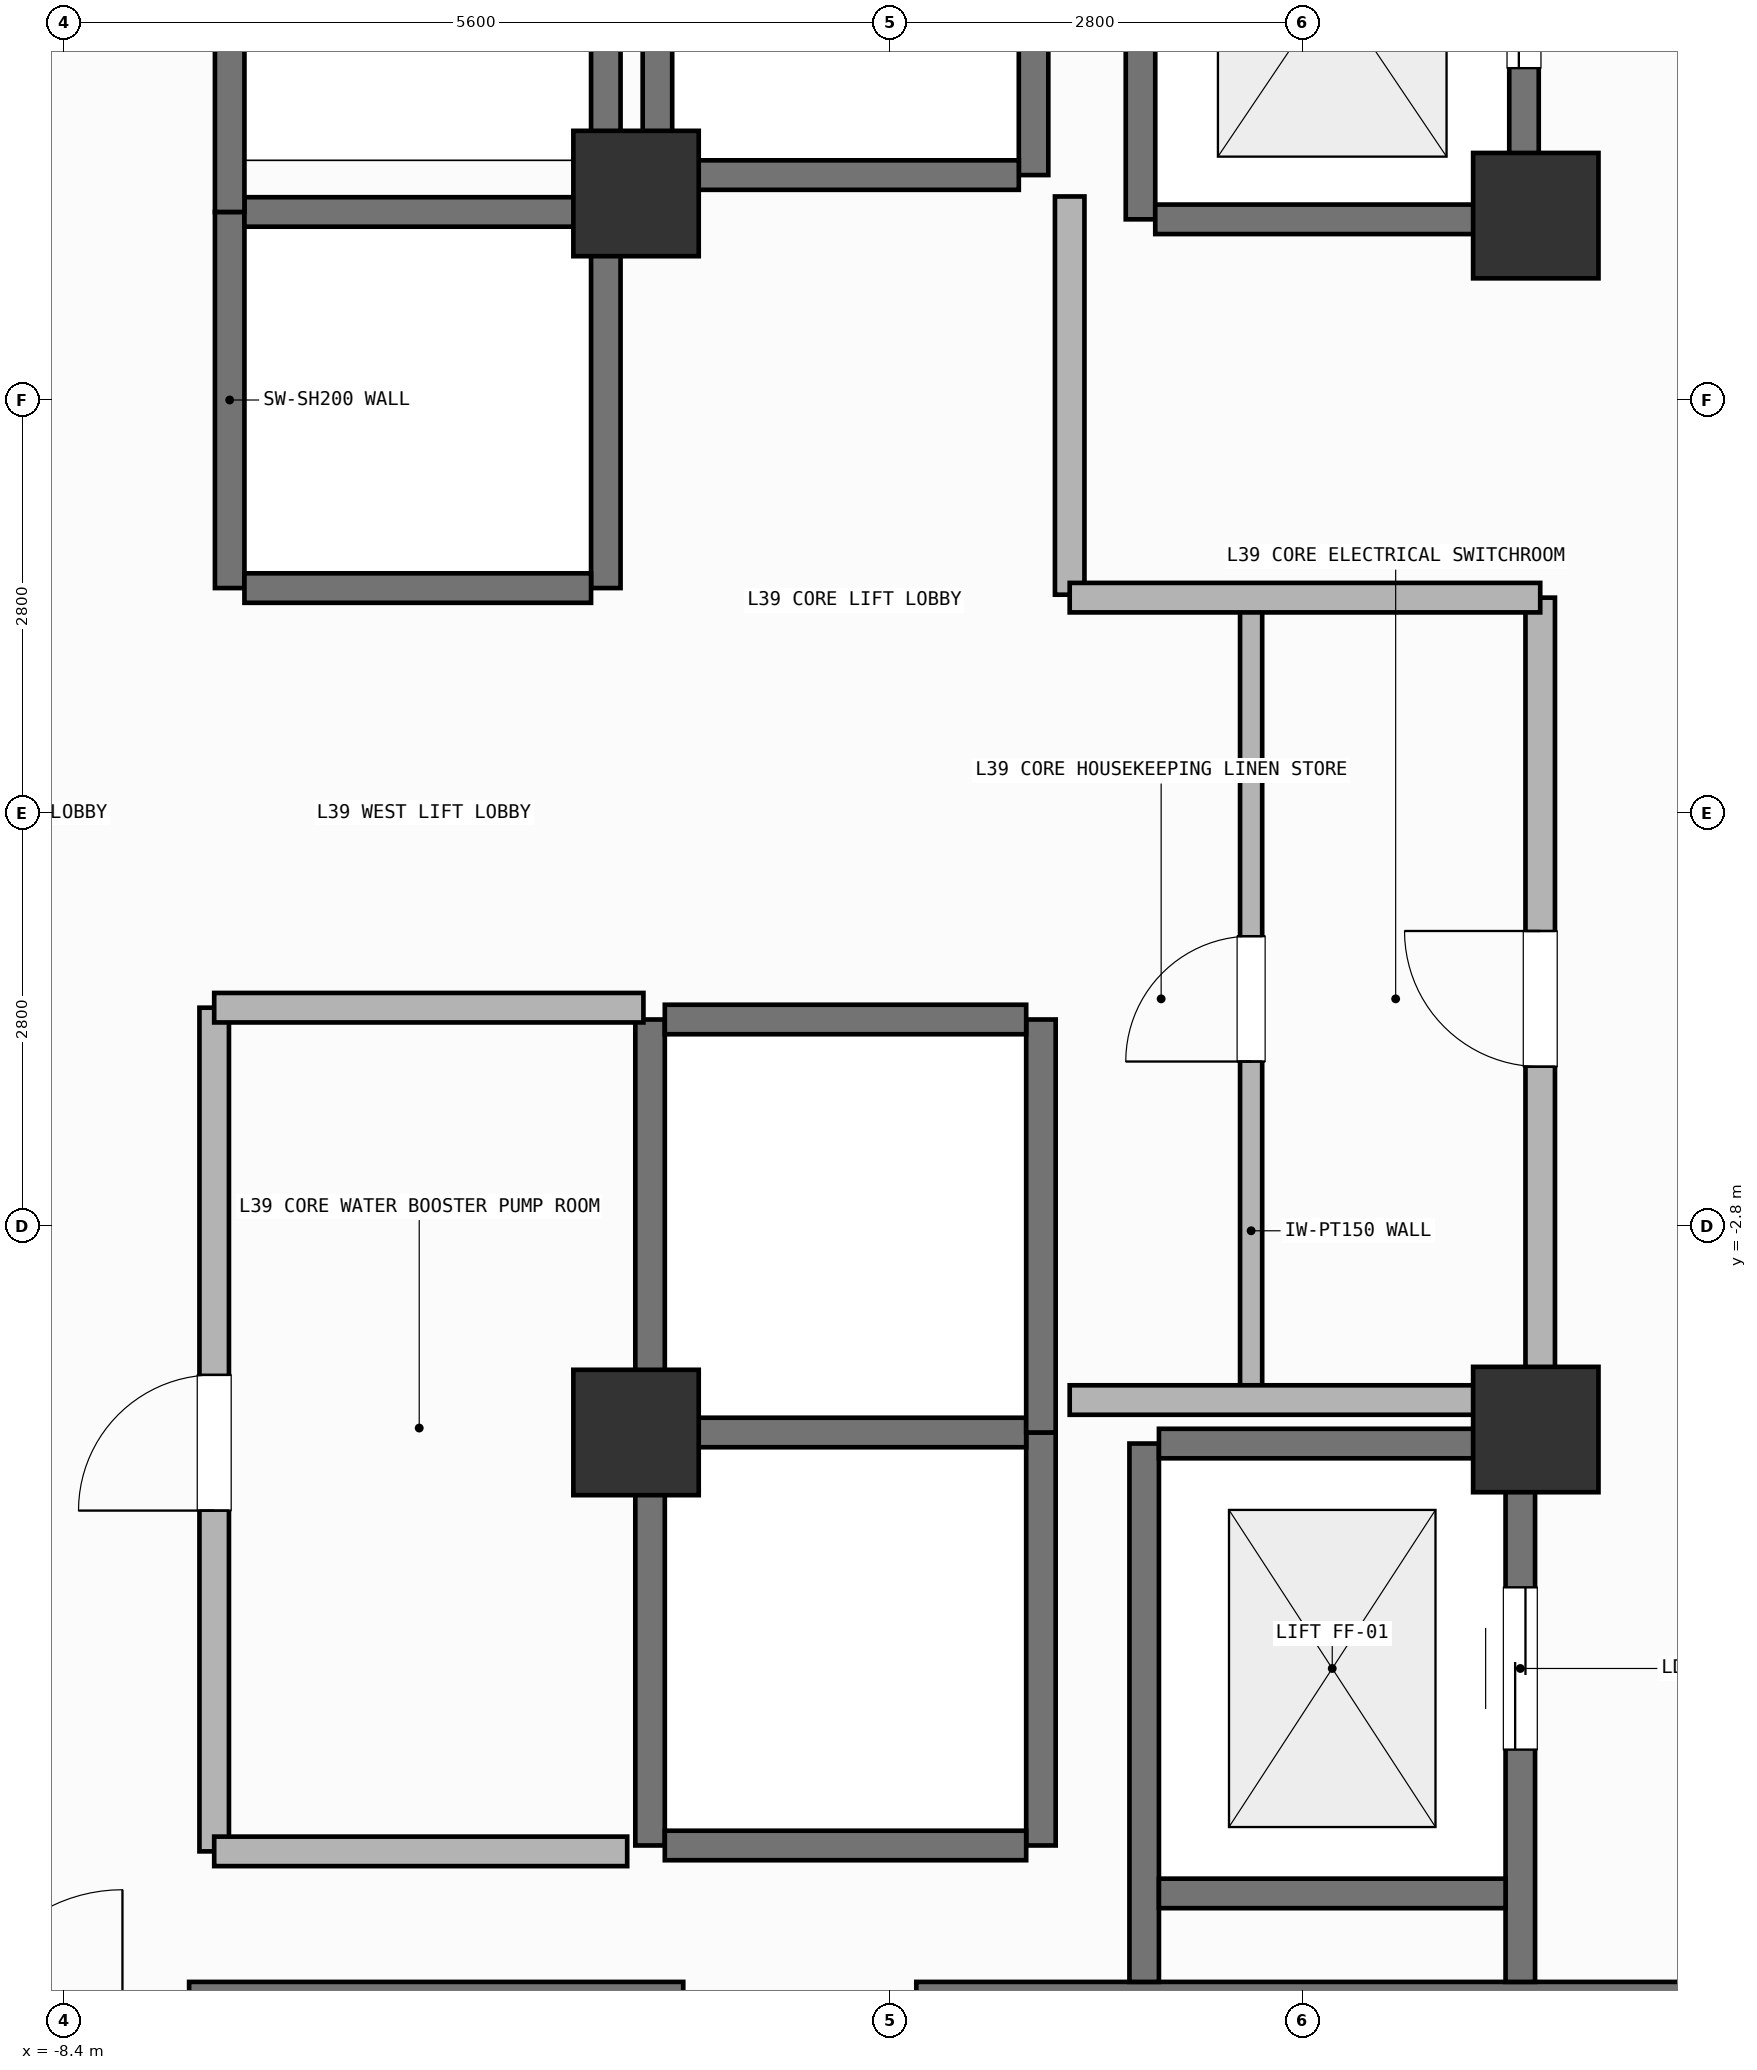
"""IFC4 building model, lengths in metres.
Left out: names, types, materials, properties, quantities, classifications, styles, units other than length and angle.
Written with IfcOpenShell. Run it as: python <this file> out.ifc"""

import sys

from ifc_helpers import new_model, si_unit, direction, frame, frame_2d, origin, origin_2d, place, context, subcontext, project, spatial, rectangle, extrude, element, fill, save


model = new_model("IFC4")
c1 = context("Model", 3, precision=1e-05, world=origin(), true_north=direction((0.0, 1.0)))
c2 = subcontext(c1, "Body", "Model", "MODEL_VIEW")
j1 = project(units=[si_unit("LENGTHUNIT", "METRE"), si_unit("PLANEANGLEUNIT", "RADIAN")], contexts=[c1])
p1 = place(None, origin())
s1 = spatial("IfcSite", under=j1, at=p1, CompositionType="ELEMENT")
p2 = place(p1, origin())
s2 = spatial("IfcBuilding", under=s1, at=p2, CompositionType="ELEMENT")
p3 = place(p2, frame((0.0, 0.0, 156.3)))
s3 = spatial("IfcBuildingStorey", under=s2, at=p3, CompositionType="ELEMENT", Elevation=156.3)
p4 = place(p3, frame((-7.55, -8.4, 0.0), z_axis=(0.0, 0.0, 1.0), x_axis=(1.0, 0.0, 0.0)))
e1 = element("IfcWall", 1, at=p4, inside=s3, PredefinedType="SHEAR", context=c2, shape_type="SweptSolid", body=[
    extrude(rectangle(XDim=3.35, YDim=0.95, at=frame_2d((1.675, 0.0))), origin(), (0.0, 0.0, 1.0), 7.8),
])
p5 = place(p3, frame((-2.62, -8.4, 0.0), z_axis=(0.0, 0.0, 1.0), x_axis=(1.0, 0.0, 0.0)))
e2 = element("IfcWall", 2, at=p5, inside=s3, PredefinedType="SHEAR", context=c2, shape_type="SweptSolid", body=[
    extrude(rectangle(XDim=7.27, YDim=0.95, at=frame_2d((3.635, 0.0))), origin(), (0.0, 0.0, 1.0), 7.8),
])
for number, where, z_axis, x_axis in (
    (3, (-4.52, -4.2, 0.0), (0.0, 0.0, 1.0), (1.0, 0.0, 0.0)),
    (4, (1.58, -4.18, 0.0), (0.0, 0.0, 1.0), (1.0, 0.0, 0.0)),
    (5, (1.58, 4.05, 0.0), (0.0, 0.0, 1.0), (1.0, 0.0, 0.0)),
    (6, (-4.52, 4.2, 0.0), (0.0, 0.0, 1.0), (1.0, 0.0, 0.0)),
):
    element("IfcColumn", number, at=place(p3, frame(where, z_axis=z_axis, x_axis=x_axis)), inside=s3, PredefinedType="COLUMN", context=c2, shape_type="SweptSolid", body=[
        extrude(rectangle(XDim=0.85, YDim=0.85, at=origin_2d()), origin(), (0.0, 0.0, 1.0), 7.8),
    ])
for number, where, z_axis, x_axis in (
    (7, (-7.275, 1.525, 0.0), (0.0, 0.0, 1.0), (0.0, 1.0, 0.0)),
    (8, (-4.725, 1.525, 0.0), (0.0, 0.0, 1.0), (0.0, 1.0, 0.0)),
):
    element("IfcWall", number, at=place(p3, frame(where, z_axis=z_axis, x_axis=x_axis)), inside=s3, PredefinedType="SHEAR", context=c2, shape_type="SweptSolid", body=[
        extrude(rectangle(XDim=2.55, YDim=0.2, at=frame_2d((1.275, 0.0))), origin(), (0.0, 0.0, 1.0), 7.58),
    ])
for number, where, z_axis, x_axis in (
    (9, (-7.175, 1.525, 0.0), (0.0, 0.0, 1.0), (1.0, 0.0, 0.0)),
    (10, (-7.175, 4.075, 0.0), (0.0, 0.0, 1.0), (1.0, 0.0, 0.0)),
):
    element("IfcWall", number, at=place(p3, frame(where, z_axis=z_axis, x_axis=x_axis)), inside=s3, PredefinedType="SHEAR", context=c2, shape_type="SweptSolid", body=[
        extrude(rectangle(XDim=2.35, YDim=0.2, at=frame_2d((1.175, 0.0))), origin(), (0.0, 0.0, 1.0), 7.58),
    ])
for number, where, z_axis, x_axis in (
    (11, (-7.275, 4.075, 0.0), (0.0, 0.0, 1.0), (0.0, 1.0, 0.0)),
    (12, (-4.725, 4.075, 0.0), (0.0, 0.0, 1.0), (0.0, 1.0, 0.0)),
):
    element("IfcWall", number, at=place(p3, frame(where, z_axis=z_axis, x_axis=x_axis)), inside=s3, PredefinedType="SHEAR", context=c2, shape_type="SweptSolid", body=[
        extrude(rectangle(XDim=2.8, YDim=0.2, at=frame_2d((1.4, 0.0))), origin(), (0.0, 0.0, 1.0), 7.58),
    ])
for number, where, z_axis, x_axis in (
    (13, (-4.375, 4.325, 0.0), (0.0, 0.0, 1.0), (0.0, 1.0, 0.0)),
    (14, (-1.825, 4.325, 0.0), (0.0, 0.0, 1.0), (0.0, 1.0, 0.0)),
):
    element("IfcWall", number, at=place(p3, frame(where, z_axis=z_axis, x_axis=x_axis)), inside=s3, PredefinedType="SHEAR", context=c2, shape_type="SweptSolid", body=[
        extrude(rectangle(XDim=2.55, YDim=0.2, at=frame_2d((1.275, 0.0))), origin(), (0.0, 0.0, 1.0), 7.58),
    ])
p6 = place(p3, frame((-4.275, 4.325, 0.0), z_axis=(0.0, 0.0, 1.0), x_axis=(1.0, 0.0, 0.0)))
e15 = element("IfcWall", 15, at=p6, inside=s3, PredefinedType="SHEAR", context=c2, shape_type="SweptSolid", body=[
    extrude(rectangle(XDim=2.35, YDim=0.2, at=frame_2d((1.175, 0.0))), origin(), (0.0, 0.0, 1.0), 7.58),
])
for number, where, z_axis, x_axis in (
    (16, (-4.425, -7.0, 0.0), (0.0, 0.0, 1.0), (0.0, 1.0, 0.0)),
    (17, (-1.775, -7.0, 0.0), (0.0, 0.0, 1.0), (0.0, 1.0, 0.0)),
):
    element("IfcWall", number, at=place(p3, frame(where, z_axis=z_axis, x_axis=x_axis)), inside=s3, PredefinedType="SHEAR", context=c2, shape_type="SweptSolid", body=[
        extrude(rectangle(XDim=2.8, YDim=0.2, at=frame_2d((1.4, 0.0))), origin(), (0.0, 0.0, 1.0), 7.58),
    ])
for number, where, z_axis, x_axis in (
    (18, (-4.325, -7.0, 0.0), (0.0, 0.0, 1.0), (1.0, 0.0, 0.0)),
    (19, (-4.325, -4.2, 0.0), (0.0, 0.0, 1.0), (1.0, 0.0, 0.0)),
):
    element("IfcWall", number, at=place(p3, frame(where, z_axis=z_axis, x_axis=x_axis)), inside=s3, PredefinedType="SHEAR", context=c2, shape_type="SweptSolid", body=[
        extrude(rectangle(XDim=2.45, YDim=0.2, at=frame_2d((1.225, 0.0))), origin(), (0.0, 0.0, 1.0), 7.58),
    ])
for number, where, z_axis, x_axis in (
    (20, (-4.425, -4.2, 0.0), (0.0, 0.0, 1.0), (0.0, 1.0, 0.0)),
    (21, (-1.775, -4.2, 0.0), (0.0, 0.0, 1.0), (0.0, 1.0, 0.0)),
):
    element("IfcWall", number, at=place(p3, frame(where, z_axis=z_axis, x_axis=x_axis)), inside=s3, PredefinedType="SHEAR", context=c2, shape_type="SweptSolid", body=[
        extrude(rectangle(XDim=2.8, YDim=0.2, at=frame_2d((1.4, 0.0))), origin(), (0.0, 0.0, 1.0), 7.58),
    ])
p7 = place(p3, frame((-4.325, -1.4, 0.0), z_axis=(0.0, 0.0, 1.0), x_axis=(1.0, 0.0, 0.0)))
e22 = element("IfcWall", 22, at=p7, inside=s3, PredefinedType="SHEAR", context=c2, shape_type="SweptSolid", body=[
    extrude(rectangle(XDim=2.45, YDim=0.2, at=frame_2d((1.225, 0.0))), origin(), (0.0, 0.0, 1.0), 7.58),
])
p8 = place(p3, frame((-1.1, 4.025, 0.0), z_axis=(0.0, 0.0, 1.0), x_axis=(0.0, 1.0, 0.0)))
e23 = element("IfcWall", 23, at=p8, inside=s3, PredefinedType="SHEAR", context=c2, shape_type="SweptSolid", body=[
    extrude(rectangle(XDim=3.15, YDim=0.2, at=frame_2d((1.575, 0.0))), origin(), (0.0, 0.0, 1.0), 7.58),
])
p9 = place(p3, frame((1.5, 4.025, 0.0), z_axis=(0.0, 0.0, 1.0), x_axis=(0.0, 1.0, 0.0)))
e24 = element("IfcWall", 24, at=p9, inside=s3, PredefinedType="SHEAR", context=c2, shape_type="SweptSolid", body=[
    extrude(rectangle(XDim=3.15, YDim=0.2, at=frame_2d((1.575, 0.0))), origin(), (0.0, 0.0, 1.0), 7.58),
])
p10 = place(p9, frame((1.025, 0.0, 0.0)))
e25 = element("IfcOpeningElement", 25, at=p10, cuts=e24, PredefinedType="OPENING", context=c2, shape_type="SweptSolid", body=[
    extrude(rectangle(XDim=1.1, YDim=2.2, at=frame_2d((0.55, 1.1))), frame((0.0, 0.11, 0.0), z_axis=(0.0, -1.0, 0.0), x_axis=(1.0, 0.0, 0.0)), (0.0, 0.0, 1.0), 0.22),
])
p11 = place(p3, frame((-1.0, 4.025, 0.0), z_axis=(0.0, 0.0, 1.0), x_axis=(1.0, 0.0, 0.0)))
e26 = element("IfcWall", 26, at=p11, inside=s3, PredefinedType="SHEAR", context=c2, shape_type="SweptSolid", body=[
    extrude(rectangle(XDim=2.4, YDim=0.2, at=frame_2d((1.2, 0.0))), origin(), (0.0, 0.0, 1.0), 7.58),
])
p12 = place(p3, frame((-1.075, -7.925, 0.0), z_axis=(0.0, 0.0, 1.0), x_axis=(0.0, 1.0, 0.0)))
e27 = element("IfcWall", 27, at=p12, inside=s3, PredefinedType="SHEAR", context=c2, shape_type="SweptSolid", body=[
    extrude(rectangle(XDim=3.65, YDim=0.2, at=frame_2d((1.825, 0.0))), origin(), (0.0, 0.0, 1.0), 7.58),
])
p13 = place(p3, frame((1.475, -7.925, 0.0), z_axis=(0.0, 0.0, 1.0), x_axis=(0.0, 1.0, 0.0)))
e28 = element("IfcWall", 28, at=p13, inside=s3, PredefinedType="SHEAR", context=c2, shape_type="SweptSolid", body=[
    extrude(rectangle(XDim=3.65, YDim=0.2, at=frame_2d((1.825, 0.0))), origin(), (0.0, 0.0, 1.0), 7.58),
])
p14 = place(p13, frame((1.575, 0.0, 0.0)))
e29 = element("IfcOpeningElement", 29, at=p14, cuts=e28, PredefinedType="OPENING", context=c2, shape_type="SweptSolid", body=[
    extrude(rectangle(XDim=1.1, YDim=2.2, at=frame_2d((0.55, 1.1))), frame((0.0, 0.11, 0.0), z_axis=(0.0, -1.0, 0.0), x_axis=(1.0, 0.0, 0.0)), (0.0, 0.0, 1.0), 0.22),
])
for number, where, z_axis, x_axis in (
    (30, (-0.975, -7.325, 0.0), (0.0, 0.0, 1.0), (1.0, 0.0, 0.0)),
    (31, (-0.975, -4.275, 0.0), (0.0, 0.0, 1.0), (1.0, 0.0, 0.0)),
):
    element("IfcWall", number, at=place(p3, frame(where, z_axis=z_axis, x_axis=x_axis)), inside=s3, PredefinedType="SHEAR", context=c2, shape_type="SweptSolid", body=[
        extrude(rectangle(XDim=2.35, YDim=0.2, at=frame_2d((1.175, 0.0))), origin(), (0.0, 0.0, 1.0), 7.58),
    ])
p15 = place(p3, frame((-0.35, -3.98, 0.0), z_axis=(0.0, 0.0, 1.0), x_axis=(0.0, 1.0, 0.0)))
e32 = element("IfcWall", 32, at=p15, inside=s3, PredefinedType="PARTITIONING", context=c2, shape_type="SweptSolid", body=[
    extrude(rectangle(XDim=5.44, YDim=0.15, at=frame_2d((2.72, 0.0))), origin(), (0.0, 0.0, 1.0), 7.58),
])
p16 = place(p15, frame((2.295, 0.0, 0.0)))
e33 = element("IfcOpeningElement", 33, at=p16, cuts=e32, PredefinedType="OPENING", context=c2, shape_type="SweptSolid", body=[
    extrude(rectangle(XDim=0.85, YDim=2.1, at=frame_2d((0.425, 1.05))), frame((0.0, 0.085, 0.0), z_axis=(0.0, -1.0, 0.0), x_axis=(1.0, 0.0, 0.0)), (0.0, 0.0, 1.0), 0.17),
])
p17 = place(p3, frame((1.61, -3.98, 0.0), z_axis=(0.0, 0.0, 1.0), x_axis=(0.0, 1.0, 0.0)))
e34 = element("IfcWall", 34, at=p17, inside=s3, PredefinedType="SOLIDWALL", context=c2, shape_type="SweptSolid", body=[
    extrude(rectangle(XDim=5.44, YDim=0.2, at=frame_2d((2.72, 0.0))), origin(), (0.0, 0.0, 1.0), 7.58),
])
p18 = place(p17, frame((2.26, 0.0, 0.0)))
e35 = element("IfcOpeningElement", 35, at=p18, cuts=e34, PredefinedType="OPENING", context=c2, shape_type="SweptSolid", body=[
    extrude(rectangle(XDim=0.92, YDim=2.1, at=frame_2d((0.46, 1.05))), frame((0.0, 0.11, 0.0), z_axis=(0.0, -1.0, 0.0), x_axis=(1.0, 0.0, 0.0)), (0.0, 0.0, 1.0), 0.22),
])
p19 = place(p3, frame((-7.38, -7.04, 0.0), z_axis=(0.0, 0.0, 1.0), x_axis=(0.0, 1.0, 0.0)))
e36 = element("IfcWall", 36, at=p19, inside=s3, PredefinedType="SOLIDWALL", context=c2, shape_type="SweptSolid", body=[
    extrude(rectangle(XDim=5.72, YDim=0.2, at=frame_2d((2.86, 0.0))), origin(), (0.0, 0.0, 1.0), 7.58),
])
p20 = place(p19, frame((2.31, 0.0, 0.0)))
e37 = element("IfcOpeningElement", 37, at=p20, cuts=e36, PredefinedType="OPENING", context=c2, shape_type="SweptSolid", body=[
    extrude(rectangle(XDim=0.92, YDim=2.1, at=frame_2d((0.46, 1.05))), frame((0.0, 0.11, 0.0), z_axis=(0.0, -1.0, 0.0), x_axis=(1.0, 0.0, 0.0)), (0.0, 0.0, 1.0), 0.22),
])
p21 = place(p3, frame((-7.38, -1.32, 0.0), z_axis=(0.0, 0.0, 1.0), x_axis=(1.0, 0.0, 0.0)))
e38 = element("IfcWall", 38, at=p21, inside=s3, PredefinedType="SOLIDWALL", context=c2, shape_type="SweptSolid", body=[
    extrude(rectangle(XDim=2.91, YDim=0.2, at=frame_2d((1.455, 0.0))), origin(), (0.0, 0.0, 1.0), 7.58),
])
p22 = place(p3, frame((-1.58, 1.48, 0.0), z_axis=(0.0, 0.0, 1.0), x_axis=(0.0, 1.0, 0.0)))
e39 = element("IfcWall", 39, at=p22, inside=s3, PredefinedType="SOLIDWALL", context=c2, shape_type="SweptSolid", body=[
    extrude(rectangle(XDim=2.7, YDim=0.2, at=frame_2d((1.35, 0.0))), origin(), (0.0, 0.0, 1.0), 7.58),
])
for number, where, z_axis, x_axis in (
    (40, (-1.58, -3.98, 0.0), (0.0, 0.0, 1.0), (1.0, 0.0, 0.0)),
    (41, (-1.58, 1.46, 0.0), (0.0, 0.0, 1.0), (1.0, 0.0, 0.0)),
):
    element("IfcWall", number, at=place(p3, frame(where, z_axis=z_axis, x_axis=x_axis)), inside=s3, PredefinedType="SOLIDWALL", context=c2, shape_type="SweptSolid", body=[
        extrude(rectangle(XDim=3.19, YDim=0.2, at=frame_2d((1.595, 0.0))), origin(), (0.0, 0.0, 1.0), 7.58),
    ])
p23 = place(p3, frame((-7.38, -7.04, 0.0), z_axis=(0.0, 0.0, 1.0), x_axis=(1.0, 0.0, 0.0)))
e42 = element("IfcWall", 42, at=p23, inside=s3, PredefinedType="SOLIDWALL", context=c2, shape_type="SweptSolid", body=[
    extrude(rectangle(XDim=2.8, YDim=0.2, at=frame_2d((1.4, 0.0))), origin(), (0.0, 0.0, 1.0), 7.58),
])
p24 = place(p10, origin())
e43 = element("IfcDoor", 43, at=p24, inside=s3, OperationType="SLIDING_TO_LEFT", PredefinedType="DOOR", context=c2, shape_type="SweptSolid", body=[
    extrude(rectangle(XDim=1.1, YDim=2.2, at=frame_2d((0.55, 1.1))), frame((0.0, 0.025, 0.0), z_axis=(0.0, -1.0, 0.0), x_axis=(1.0, 0.0, 0.0)), (0.0, 0.0, 1.0), 0.05),
])
fill(e25, e43)
p25 = place(p14, origin())
e44 = element("IfcDoor", 44, at=p25, inside=s3, OperationType="SLIDING_TO_LEFT", PredefinedType="DOOR", context=c2, shape_type="SweptSolid", body=[
    extrude(rectangle(XDim=1.1, YDim=2.2, at=frame_2d((0.55, 1.1))), frame((0.0, 0.025, 0.0), z_axis=(0.0, -1.0, 0.0), x_axis=(1.0, 0.0, 0.0)), (0.0, 0.0, 1.0), 0.05),
])
fill(e29, e44)
p26 = place(p16, origin())
e45 = element("IfcDoor", 45, at=p26, inside=s3, OperationType="SINGLE_SWING_LEFT", PredefinedType="DOOR", context=c2, shape_type="SweptSolid", body=[
    extrude(rectangle(XDim=0.85, YDim=2.1, at=frame_2d((0.425, 1.05))), frame((0.0, 0.025, 0.0), z_axis=(0.0, -1.0, 0.0), x_axis=(1.0, 0.0, 0.0)), (0.0, 0.0, 1.0), 0.05),
])
fill(e33, e45)
p27 = place(p18, origin())
e46 = element("IfcDoor", 46, at=p27, inside=s3, OperationType="SINGLE_SWING_RIGHT", PredefinedType="DOOR", context=c2, shape_type="SweptSolid", body=[
    extrude(rectangle(XDim=0.92, YDim=2.1, at=frame_2d((0.46, 1.05))), frame((0.0, 0.025, 0.0), z_axis=(0.0, -1.0, 0.0), x_axis=(1.0, 0.0, 0.0)), (0.0, 0.0, 1.0), 0.05),
])
fill(e35, e46)
p28 = place(p20, origin())
e47 = element("IfcDoor", 47, at=p28, inside=s3, OperationType="SINGLE_SWING_LEFT", PredefinedType="DOOR", context=c2, shape_type="SweptSolid", body=[
    extrude(rectangle(XDim=0.92, YDim=2.1, at=frame_2d((0.46, 1.05))), frame((0.0, 0.025, 0.0), z_axis=(0.0, -1.0, 0.0), x_axis=(1.0, 0.0, 0.0)), (0.0, 0.0, 1.0), 0.05),
])
fill(e37, e47)
save(model, sys.argv[1])
